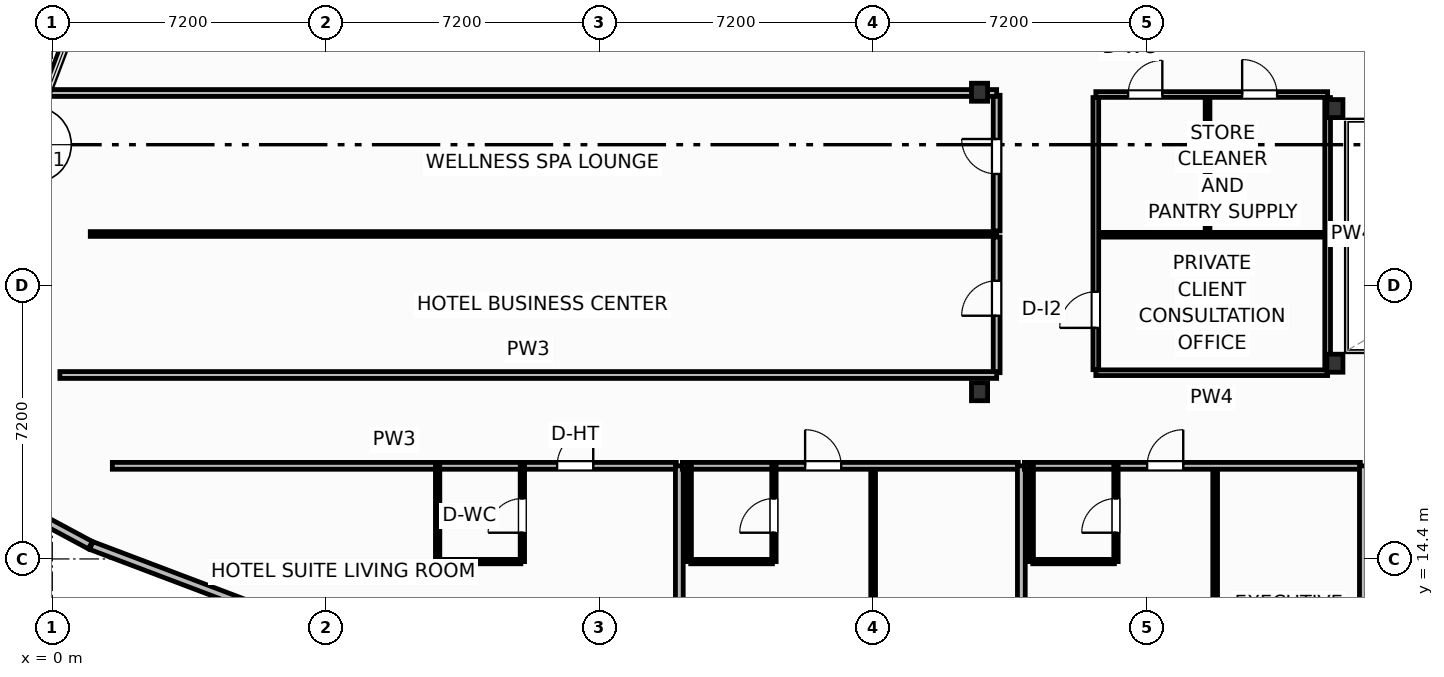
"""IFC4 building model, lengths in metres.
Left out: names, types, materials, properties, quantities, classifications, styles, units other than length and angle.
Written with IfcOpenShell. Run it as: python <this file> out.ifc"""

import sys

from ifc_helpers import new_model, si_unit, direction, frame, frame_2d, origin, origin_2d, place, context, subcontext, project, spatial, rectangle, i_section, extrude, element, fill, save


model = new_model("IFC4")
c1 = context("Model", 3, precision=1e-05, world=origin(), true_north=direction((0.0, 1.0)))
c2 = subcontext(c1, "Body", "Model", "MODEL_VIEW")
j1 = project(units=[si_unit("LENGTHUNIT", "METRE"), si_unit("PLANEANGLEUNIT", "RADIAN")], contexts=[c1])
p1 = place(None, origin())
s1 = spatial("IfcSite", under=j1, at=p1, CompositionType="ELEMENT")
p2 = place(p1, origin())
s2 = spatial("IfcBuilding", under=s1, at=p2, CompositionType="ELEMENT")
p3 = place(p2, frame((0.0, 0.0, 83.6)))
s3 = spatial("IfcBuildingStorey", under=s2, at=p3, CompositionType="ELEMENT", Elevation=83.6)
for number, where, z_axis, x_axis in (
    (1, (33.75, 19.55, 0.0), (0.0, 0.0, 1.0), (1.0, 0.0, 0.0)),
    (2, (33.75, 26.25, 0.0), (0.0, 0.0, 1.0), (1.0, 0.0, 0.0)),
    (3, (24.4, 18.8, 0.0), (0.0, 0.0, 1.0), (1.0, 0.0, 0.0)),
    (4, (24.4, 26.68, 0.0), (0.0, 0.0, 1.0), (1.0, 0.0, 0.0)),
):
    element("IfcColumn", number, at=place(p3, frame(where, z_axis=z_axis, x_axis=x_axis)), inside=s3, PredefinedType="COLUMN", context=c2, shape_type="SweptSolid", body=[
        extrude(i_section(OverallWidth=0.424, OverallDepth=0.474, WebThickness=0.048, FlangeThickness=0.077, FilletRadius=0.025, at=origin_2d()), origin(), (0.0, 0.0, 1.0), 3.7),
    ])
p4 = place(p3, frame((-0.197, 15.406, 0.0), z_axis=(0.0, 0.0, 1.0), x_axis=(0.881023507585, -0.47307248819, 0.0)))
e5 = element("IfcWall", 5, at=p4, inside=s3, PredefinedType="SOLIDWALL", context=c2, shape_type="SweptSolid", body=[
    extrude(rectangle(XDim=1.361, YDim=0.22, at=frame_2d((0.68, 0.0))), origin(), (0.0, 0.0, 1.0), 2.73),
])
p5 = place(p3, frame((1.026, 14.753, 0.0), z_axis=(0.0, 0.0, 1.0), x_axis=(0.935222448475, -0.354060689526, 0.0)))
e6 = element("IfcWall", 6, at=p5, inside=s3, PredefinedType="SOLIDWALL", context=c2, shape_type="SweptSolid", body=[
    extrude(rectangle(XDim=14.447, YDim=0.22, at=frame_2d((7.224, 0.0))), origin(), (0.0, 0.0, 1.0), 2.73),
])
p6 = place(p5, frame((6.399, 0.0, 0.8)))
e7 = element("IfcOpeningElement", 7, at=p6, cuts=e6, PredefinedType="OPENING", context=c2, shape_type="SweptSolid", body=[
    extrude(rectangle(XDim=1.65, YDim=1.65, at=frame_2d((0.825, 0.825))), frame((0.0, 0.12, 0.0), z_axis=(0.0, -1.0, 0.0), x_axis=(1.0, 0.0, 0.0)), (0.0, 0.0, 1.0), 0.24),
])
p7 = place(p3, frame((1.58, 16.85, 0.0), z_axis=(0.0, 0.0, 1.0), x_axis=(1.0, 0.0, 0.0)))
e8 = element("IfcWall", 8, at=p7, inside=s3, PredefinedType="PARTITIONING", context=c2, shape_type="SweptSolid", body=[
    extrude(rectangle(XDim=14.84, YDim=0.18, at=frame_2d((7.42, 0.0))), origin(), (0.0, 0.0, 1.0), 3.45),
])
p8 = place(p7, frame((11.705, 0.0, 0.0)))
e9 = element("IfcOpeningElement", 9, at=p8, cuts=e8, PredefinedType="OPENING", context=c2, shape_type="SweptSolid", body=[
    extrude(rectangle(XDim=0.95, YDim=2.15, at=frame_2d((0.475, 1.075))), frame((0.0, 0.1, 0.0), z_axis=(0.0, -1.0, 0.0), x_axis=(1.0, 0.0, 0.0)), (0.0, 0.0, 1.0), 0.2),
])
p9 = place(p3, frame((10.18, 14.33, 0.0), z_axis=(0.0, 0.0, 1.0), x_axis=(1.0, 0.0, 0.0)))
e10 = element("IfcWall", 10, at=p9, inside=s3, PredefinedType="PARTITIONING", context=c2, shape_type="SweptSolid", body=[
    extrude(rectangle(XDim=2.15, YDim=0.115, at=frame_2d((1.075, 0.0))), origin(), (0.0, 0.0, 1.0), 3.45),
])
p10 = place(p3, frame((12.37, 14.33, 0.0), z_axis=(0.0, 0.0, 1.0), x_axis=(0.0, 1.0, 0.0)))
e11 = element("IfcWall", 11, at=p10, inside=s3, PredefinedType="PARTITIONING", context=c2, shape_type="SweptSolid", body=[
    extrude(rectangle(XDim=2.52, YDim=0.115, at=frame_2d((1.26, 0.0))), origin(), (0.0, 0.0, 1.0), 3.45),
])
p11 = place(p10, frame((0.76, 0.0, 0.0)))
e12 = element("IfcOpeningElement", 12, at=p11, cuts=e11, PredefinedType="OPENING", context=c2, shape_type="SweptSolid", body=[
    extrude(rectangle(XDim=0.9, YDim=2.05, at=frame_2d((0.45, 1.025))), frame((0.0, 0.067, 0.0), z_axis=(0.0, -1.0, 0.0), x_axis=(1.0, 0.0, 0.0)), (0.0, 0.0, 1.0), 0.135),
])
p12 = place(p3, frame((10.14, 14.33, 0.0), z_axis=(0.0, 0.0, 1.0), x_axis=(0.0, 1.0, 0.0)))
e13 = element("IfcWall", 13, at=p12, inside=s3, PredefinedType="PARTITIONING", context=c2, shape_type="SweptSolid", body=[
    extrude(rectangle(XDim=2.52, YDim=0.115, at=frame_2d((1.26, 0.0))), origin(), (0.0, 0.0, 1.0), 3.45),
])
p13 = place(p3, frame((16.5, 11.161, 0.0), z_axis=(0.0, 0.0, 1.0), x_axis=(0.0, 1.0, 0.0)))
e14 = element("IfcWall", 14, at=p13, inside=s3, PredefinedType="PARTITIONING", context=c2, shape_type="SweptSolid", body=[
    extrude(rectangle(XDim=5.689, YDim=0.205, at=frame_2d((2.844, 0.0))), origin(), (0.0, 0.0, 1.0), 3.45),
])
p14 = place(p3, frame((21.6, 6.985, 0.0), z_axis=(0.0, 0.0, 1.0), x_axis=(0.0, 1.0, 0.0)))
e15 = element("IfcWall", 15, at=p14, inside=s3, PredefinedType="PARTITIONING", context=c2, shape_type="SweptSolid", body=[
    extrude(rectangle(XDim=9.865, YDim=0.125, at=frame_2d((4.933, 0.0))), origin(), (0.0, 0.0, 1.0), 3.45),
])
p15 = place(p14, frame((3.578, 0.0, 0.0)))
e16 = element("IfcOpeningElement", 16, at=p15, cuts=e15, PredefinedType="OPENING", context=c2, shape_type="SweptSolid", body=[
    extrude(rectangle(XDim=0.92, YDim=2.05, at=frame_2d((0.46, 1.025))), frame((0.0, 0.073, 0.0), z_axis=(0.0, -1.0, 0.0), x_axis=(1.0, 0.0, 0.0)), (0.0, 0.0, 1.0), 0.145),
])
p16 = place(p3, frame((16.58, 16.85, 0.0), z_axis=(0.0, 0.0, 1.0), x_axis=(1.0, 0.0, 0.0)))
e17 = element("IfcWall", 17, at=p16, inside=s3, PredefinedType="PARTITIONING", context=c2, shape_type="SweptSolid", body=[
    extrude(rectangle(XDim=8.84, YDim=0.18, at=frame_2d((4.42, 0.0))), origin(), (0.0, 0.0, 1.0), 3.45),
])
p17 = place(p16, frame((3.23, 0.0, 0.0)))
e18 = element("IfcOpeningElement", 18, at=p17, cuts=e17, PredefinedType="OPENING", context=c2, shape_type="SweptSolid", body=[
    extrude(rectangle(XDim=0.95, YDim=2.15, at=frame_2d((0.475, 1.075))), frame((0.0, 0.1, 0.0), z_axis=(0.0, -1.0, 0.0), x_axis=(1.0, 0.0, 0.0)), (0.0, 0.0, 1.0), 0.2),
])
p18 = place(p3, frame((16.8, 14.33, 0.0), z_axis=(0.0, 0.0, 1.0), x_axis=(1.0, 0.0, 0.0)))
e19 = element("IfcWall", 19, at=p18, inside=s3, PredefinedType="PARTITIONING", context=c2, shape_type="SweptSolid", body=[
    extrude(rectangle(XDim=2.15, YDim=0.115, at=frame_2d((1.075, 0.0))), origin(), (0.0, 0.0, 1.0), 3.45),
])
p19 = place(p3, frame((18.99, 14.33, 0.0), z_axis=(0.0, 0.0, 1.0), x_axis=(0.0, 1.0, 0.0)))
e20 = element("IfcWall", 20, at=p19, inside=s3, PredefinedType="PARTITIONING", context=c2, shape_type="SweptSolid", body=[
    extrude(rectangle(XDim=2.52, YDim=0.115, at=frame_2d((1.26, 0.0))), origin(), (0.0, 0.0, 1.0), 3.45),
])
p20 = place(p19, frame((0.76, 0.0, 0.0)))
e21 = element("IfcOpeningElement", 21, at=p20, cuts=e20, PredefinedType="OPENING", context=c2, shape_type="SweptSolid", body=[
    extrude(rectangle(XDim=0.9, YDim=2.05, at=frame_2d((0.45, 1.025))), frame((0.0, 0.067, 0.0), z_axis=(0.0, -1.0, 0.0), x_axis=(1.0, 0.0, 0.0)), (0.0, 0.0, 1.0), 0.135),
])
p21 = place(p3, frame((16.76, 14.33, 0.0), z_axis=(0.0, 0.0, 1.0), x_axis=(0.0, 1.0, 0.0)))
e22 = element("IfcWall", 22, at=p21, inside=s3, PredefinedType="PARTITIONING", context=c2, shape_type="SweptSolid", body=[
    extrude(rectangle(XDim=2.52, YDim=0.115, at=frame_2d((1.26, 0.0))), origin(), (0.0, 0.0, 1.0), 3.45),
])
p22 = place(p3, frame((25.5, 5.509, 0.0), z_axis=(0.0, 0.0, 1.0), x_axis=(0.0, 1.0, 0.0)))
e23 = element("IfcWall", 23, at=p22, inside=s3, PredefinedType="PARTITIONING", context=c2, shape_type="SweptSolid", body=[
    extrude(rectangle(XDim=11.342, YDim=0.205, at=frame_2d((5.671, 0.0))), origin(), (0.0, 0.0, 1.0), 3.45),
])
p23 = place(p3, frame((30.6, 5.823, 0.0), z_axis=(0.0, 0.0, 1.0), x_axis=(0.0, 1.0, 0.0)))
e24 = element("IfcWall", 24, at=p23, inside=s3, PredefinedType="PARTITIONING", context=c2, shape_type="SweptSolid", body=[
    extrude(rectangle(XDim=11.027, YDim=0.125, at=frame_2d((5.513, 0.0))), origin(), (0.0, 0.0, 1.0), 3.45),
])
p24 = place(p23, frame((1.42, 0.0, 0.0)))
e25 = element("IfcOpeningElement", 25, at=p24, cuts=e24, PredefinedType="OPENING", context=c2, shape_type="SweptSolid", body=[
    extrude(rectangle(XDim=0.92, YDim=2.05, at=frame_2d((0.46, 1.025))), frame((0.0, 0.073, 0.0), z_axis=(0.0, -1.0, 0.0), x_axis=(1.0, 0.0, 0.0)), (0.0, 0.0, 1.0), 0.145),
])
p25 = place(p3, frame((25.58, 16.85, 0.0), z_axis=(0.0, 0.0, 1.0), x_axis=(1.0, 0.0, 0.0)))
e26 = element("IfcWall", 26, at=p25, inside=s3, PredefinedType="PARTITIONING", context=c2, shape_type="SweptSolid", body=[
    extrude(rectangle(XDim=8.84, YDim=0.18, at=frame_2d((4.42, 0.0))), origin(), (0.0, 0.0, 1.0), 3.45),
])
p26 = place(p25, frame((3.23, 0.0, 0.0)))
e27 = element("IfcOpeningElement", 27, at=p26, cuts=e26, PredefinedType="OPENING", context=c2, shape_type="SweptSolid", body=[
    extrude(rectangle(XDim=0.95, YDim=2.15, at=frame_2d((0.475, 1.075))), frame((0.0, 0.1, 0.0), z_axis=(0.0, -1.0, 0.0), x_axis=(1.0, 0.0, 0.0)), (0.0, 0.0, 1.0), 0.2),
])
p27 = place(p3, frame((25.8, 14.33, 0.0), z_axis=(0.0, 0.0, 1.0), x_axis=(1.0, 0.0, 0.0)))
e28 = element("IfcWall", 28, at=p27, inside=s3, PredefinedType="PARTITIONING", context=c2, shape_type="SweptSolid", body=[
    extrude(rectangle(XDim=2.15, YDim=0.115, at=frame_2d((1.075, 0.0))), origin(), (0.0, 0.0, 1.0), 3.45),
])
p28 = place(p3, frame((27.99, 14.33, 0.0), z_axis=(0.0, 0.0, 1.0), x_axis=(0.0, 1.0, 0.0)))
e29 = element("IfcWall", 29, at=p28, inside=s3, PredefinedType="PARTITIONING", context=c2, shape_type="SweptSolid", body=[
    extrude(rectangle(XDim=2.52, YDim=0.115, at=frame_2d((1.26, 0.0))), origin(), (0.0, 0.0, 1.0), 3.45),
])
p29 = place(p28, frame((0.76, 0.0, 0.0)))
e30 = element("IfcOpeningElement", 30, at=p29, cuts=e29, PredefinedType="OPENING", context=c2, shape_type="SweptSolid", body=[
    extrude(rectangle(XDim=0.9, YDim=2.05, at=frame_2d((0.45, 1.025))), frame((0.0, 0.067, 0.0), z_axis=(0.0, -1.0, 0.0), x_axis=(1.0, 0.0, 0.0)), (0.0, 0.0, 1.0), 0.135),
])
p30 = place(p3, frame((25.76, 14.33, 0.0), z_axis=(0.0, 0.0, 1.0), x_axis=(0.0, 1.0, 0.0)))
e31 = element("IfcWall", 31, at=p30, inside=s3, PredefinedType="PARTITIONING", context=c2, shape_type="SweptSolid", body=[
    extrude(rectangle(XDim=2.52, YDim=0.115, at=frame_2d((1.26, 0.0))), origin(), (0.0, 0.0, 1.0), 3.45),
])
p31 = place(p3, frame((34.5, 4.344, 0.0), z_axis=(0.0, 0.0, 1.0), x_axis=(0.0, 1.0, 0.0)))
e32 = element("IfcWall", 32, at=p31, inside=s3, PredefinedType="PARTITIONING", context=c2, shape_type="SweptSolid", body=[
    extrude(rectangle(XDim=12.506, YDim=0.205, at=frame_2d((6.253, 0.0))), origin(), (0.0, 0.0, 1.0), 3.45),
])
p32 = place(p3, frame((24.85, 19.3, 0.0), z_axis=(0.0, 0.0, 1.0), x_axis=(0.0, 1.0, 0.0)))
e33 = element("IfcWall", 33, at=p32, inside=s3, PredefinedType="PARTITIONING", context=c2, shape_type="SweptSolid", body=[
    extrude(rectangle(XDim=3.57, YDim=0.18, at=frame_2d((1.785, 0.0))), origin(), (0.0, 0.0, 1.0), 3.45),
])
p33 = place(p32, frame((1.5, 0.0, 0.0)))
e34 = element("IfcOpeningElement", 34, at=p33, cuts=e33, PredefinedType="OPENING", context=c2, shape_type="SweptSolid", body=[
    extrude(rectangle(XDim=0.92, YDim=2.05, at=frame_2d((0.46, 1.025))), frame((0.0, 0.1, 0.0), z_axis=(0.0, -1.0, 0.0), x_axis=(1.0, 0.0, 0.0)), (0.0, 0.0, 1.0), 0.2),
])
p34 = place(p3, frame((24.85, 23.03, 0.0), z_axis=(0.0, 0.0, 1.0), x_axis=(0.0, 1.0, 0.0)))
e35 = element("IfcWall", 35, at=p34, inside=s3, PredefinedType="PARTITIONING", context=c2, shape_type="SweptSolid", body=[
    extrude(rectangle(XDim=3.57, YDim=0.18, at=frame_2d((1.785, 0.0))), origin(), (0.0, 0.0, 1.0), 3.45),
])
p35 = place(p34, frame((1.5, 0.0, 0.0)))
e36 = element("IfcOpeningElement", 36, at=p35, cuts=e35, PredefinedType="OPENING", context=c2, shape_type="SweptSolid", body=[
    extrude(rectangle(XDim=0.92, YDim=2.05, at=frame_2d((0.46, 1.025))), frame((0.0, 0.1, 0.0), z_axis=(0.0, -1.0, 0.0), x_axis=(1.0, 0.0, 0.0)), (0.0, 0.0, 1.0), 0.2),
])
p36 = place(p3, frame((1.0, 22.95, 0.0), z_axis=(0.0, 0.0, 1.0), x_axis=(1.0, 0.0, 0.0)))
e37 = element("IfcWall", 37, at=p36, inside=s3, PredefinedType="PARTITIONING", context=c2, shape_type="SweptSolid", body=[
    extrude(rectangle(XDim=23.85, YDim=0.125, at=frame_2d((11.925, 0.0))), origin(), (0.0, 0.0, 1.0), 3.45),
])
p37 = place(p3, frame((0.2, 19.24, 0.0), z_axis=(0.0, 0.0, 1.0), x_axis=(1.0, 0.0, 0.0)))
e38 = element("IfcWall", 38, at=p37, inside=s3, PredefinedType="PARTITIONING", context=c2, shape_type="SweptSolid", body=[
    extrude(rectangle(XDim=24.65, YDim=0.18, at=frame_2d((12.325, 0.0))), origin(), (0.0, 0.0, 1.0), 3.45),
])
p38 = place(p3, frame((-0.086, 26.66, 0.0), z_axis=(0.0, 0.0, 1.0), x_axis=(1.0, 0.0, 0.0)))
e39 = element("IfcWall", 39, at=p38, inside=s3, PredefinedType="PARTITIONING", context=c2, shape_type="SweptSolid", body=[
    extrude(rectangle(XDim=24.936, YDim=0.18, at=frame_2d((12.468, 0.0))), origin(), (0.0, 0.0, 1.0), 2.662),
])
p39 = place(p3, frame((27.46, 19.3, 0.0), z_axis=(0.0, 0.0, 1.0), x_axis=(1.0, 0.0, 0.0)))
e40 = element("IfcWall", 40, at=p39, inside=s3, PredefinedType="PARTITIONING", context=c2, shape_type="SweptSolid", body=[
    extrude(rectangle(XDim=6.1, YDim=0.15, at=frame_2d((3.05, 0.0))), origin(), (0.0, 0.0, 1.0), 2.662),
])
p40 = place(p3, frame((27.46, 26.62, 0.0), z_axis=(0.0, 0.0, 1.0), x_axis=(1.0, 0.0, 0.0)))
e41 = element("IfcWall", 41, at=p40, inside=s3, PredefinedType="PARTITIONING", context=c2, shape_type="SweptSolid", body=[
    extrude(rectangle(XDim=6.1, YDim=0.15, at=frame_2d((3.05, 0.0))), origin(), (0.0, 0.0, 1.0), 2.662),
])
p41 = place(p40, frame((0.85, 0.0, 0.0)))
e42 = element("IfcOpeningElement", 42, at=p41, cuts=e41, PredefinedType="OPENING", context=c2, shape_type="SweptSolid", body=[
    extrude(rectangle(XDim=0.9, YDim=2.05, at=frame_2d((0.45, 1.025))), frame((0.0, 0.085, 0.0), z_axis=(0.0, -1.0, 0.0), x_axis=(1.0, 0.0, 0.0)), (0.0, 0.0, 1.0), 0.17),
])
p42 = place(p40, frame((3.85, 0.0, 0.0)))
e43 = element("IfcOpeningElement", 43, at=p42, cuts=e41, PredefinedType="OPENING", context=c2, shape_type="SweptSolid", body=[
    extrude(rectangle(XDim=0.92, YDim=2.05, at=frame_2d((0.46, 1.025))), frame((0.0, 0.085, 0.0), z_axis=(0.0, -1.0, 0.0), x_axis=(1.0, 0.0, 0.0)), (0.0, 0.0, 1.0), 0.17),
])
p43 = place(p3, frame((27.52, 22.93, 0.0), z_axis=(0.0, 0.0, 1.0), x_axis=(1.0, 0.0, 0.0)))
e44 = element("IfcWall", 44, at=p43, inside=s3, PredefinedType="PARTITIONING", context=c2, shape_type="SweptSolid", body=[
    extrude(rectangle(XDim=6.0, YDim=0.125, at=frame_2d((3.0, 0.0))), origin(), (0.0, 0.0, 1.0), 3.45),
])
p44 = place(p3, frame((30.4, 23.0, 0.0), z_axis=(0.0, 0.0, 1.0), x_axis=(0.0, 1.0, 0.0)))
e45 = element("IfcWall", 45, at=p44, inside=s3, PredefinedType="PARTITIONING", context=c2, shape_type="SweptSolid", body=[
    extrude(rectangle(XDim=3.54, YDim=0.125, at=frame_2d((1.77, 0.0))), origin(), (0.0, 0.0, 1.0), 3.45),
])
p45 = place(p3, frame((27.46, 19.38, 0.0), z_axis=(0.0, 0.0, 1.0), x_axis=(0.0, 1.0, 0.0)))
e46 = element("IfcWall", 46, at=p45, inside=s3, PredefinedType="PARTITIONING", context=c2, shape_type="SweptSolid", body=[
    extrude(rectangle(XDim=7.16, YDim=0.15, at=frame_2d((3.58, 0.0))), origin(), (0.0, 0.0, 1.0), 3.45),
])
p46 = place(p45, frame((1.1, 0.0, 0.0)))
e47 = element("IfcOpeningElement", 47, at=p46, cuts=e46, PredefinedType="OPENING", context=c2, shape_type="SweptSolid", body=[
    extrude(rectangle(XDim=0.95, YDim=2.05, at=frame_2d((0.475, 1.025))), frame((0.0, 0.085, 0.0), z_axis=(0.0, -1.0, 0.0), x_axis=(1.0, 0.0, 0.0)), (0.0, 0.0, 1.0), 0.17),
])
p47 = place(p3, frame((33.56, 19.38, 0.0), z_axis=(0.0, 0.0, 1.0), x_axis=(0.0, 1.0, 0.0)))
e48 = element("IfcWall", 48, at=p47, inside=s3, PredefinedType="PARTITIONING", context=c2, shape_type="SweptSolid", body=[
    extrude(rectangle(XDim=7.16, YDim=0.15, at=frame_2d((3.58, 0.0))), origin(), (0.0, 0.0, 1.0), 2.824),
])
p48 = place(p8, origin())
e49 = element("IfcDoor", 49, at=p48, inside=s3, OperationType="SINGLE_SWING_RIGHT", PredefinedType="DOOR", context=c2, shape_type="SweptSolid", body=[
    extrude(rectangle(XDim=0.95, YDim=2.15, at=frame_2d((0.475, 1.075))), frame((0.0, 0.025, 0.0), z_axis=(0.0, -1.0, 0.0), x_axis=(1.0, 0.0, 0.0)), (0.0, 0.0, 1.0), 0.05),
])
fill(e9, e49)
p49 = place(p11, origin())
e50 = element("IfcDoor", 50, at=p49, inside=s3, OperationType="SINGLE_SWING_LEFT", PredefinedType="DOOR", context=c2, shape_type="SweptSolid", body=[
    extrude(rectangle(XDim=0.9, YDim=2.05, at=frame_2d((0.45, 1.025))), frame((0.0, 0.025, 0.0), z_axis=(0.0, -1.0, 0.0), x_axis=(1.0, 0.0, 0.0)), (0.0, 0.0, 1.0), 0.05),
])
fill(e12, e50)
p50 = place(p17, origin())
e51 = element("IfcDoor", 51, at=p50, inside=s3, OperationType="SINGLE_SWING_LEFT", PredefinedType="DOOR", context=c2, shape_type="SweptSolid", body=[
    extrude(rectangle(XDim=0.95, YDim=2.15, at=frame_2d((0.475, 1.075))), frame((0.0, 0.025, 0.0), z_axis=(0.0, -1.0, 0.0), x_axis=(1.0, 0.0, 0.0)), (0.0, 0.0, 1.0), 0.05),
])
fill(e18, e51)
p51 = place(p20, origin())
e52 = element("IfcDoor", 52, at=p51, inside=s3, OperationType="SINGLE_SWING_LEFT", PredefinedType="DOOR", context=c2, shape_type="SweptSolid", body=[
    extrude(rectangle(XDim=0.9, YDim=2.05, at=frame_2d((0.45, 1.025))), frame((0.0, 0.025, 0.0), z_axis=(0.0, -1.0, 0.0), x_axis=(1.0, 0.0, 0.0)), (0.0, 0.0, 1.0), 0.05),
])
fill(e21, e52)
p52 = place(p26, origin())
e53 = element("IfcDoor", 53, at=p52, inside=s3, OperationType="SINGLE_SWING_RIGHT", PredefinedType="DOOR", context=c2, shape_type="SweptSolid", body=[
    extrude(rectangle(XDim=0.95, YDim=2.15, at=frame_2d((0.475, 1.075))), frame((0.0, 0.025, 0.0), z_axis=(0.0, -1.0, 0.0), x_axis=(1.0, 0.0, 0.0)), (0.0, 0.0, 1.0), 0.05),
])
fill(e27, e53)
p53 = place(p29, origin())
e54 = element("IfcDoor", 54, at=p53, inside=s3, OperationType="SINGLE_SWING_LEFT", PredefinedType="DOOR", context=c2, shape_type="SweptSolid", body=[
    extrude(rectangle(XDim=0.9, YDim=2.05, at=frame_2d((0.45, 1.025))), frame((0.0, 0.025, 0.0), z_axis=(0.0, -1.0, 0.0), x_axis=(1.0, 0.0, 0.0)), (0.0, 0.0, 1.0), 0.05),
])
fill(e30, e54)
p54 = place(p33, origin())
e55 = element("IfcDoor", 55, at=p54, inside=s3, OperationType="SINGLE_SWING_LEFT", PredefinedType="DOOR", context=c2, shape_type="SweptSolid", body=[
    extrude(rectangle(XDim=0.92, YDim=2.05, at=frame_2d((0.46, 1.025))), frame((0.0, 0.025, 0.0), z_axis=(0.0, -1.0, 0.0), x_axis=(1.0, 0.0, 0.0)), (0.0, 0.0, 1.0), 0.05),
])
fill(e34, e55)
p55 = place(p35, origin())
e56 = element("IfcDoor", 56, at=p55, inside=s3, OperationType="SINGLE_SWING_RIGHT", PredefinedType="DOOR", context=c2, shape_type="SweptSolid", body=[
    extrude(rectangle(XDim=0.92, YDim=2.05, at=frame_2d((0.46, 1.025))), frame((0.0, 0.025, 0.0), z_axis=(0.0, -1.0, 0.0), x_axis=(1.0, 0.0, 0.0)), (0.0, 0.0, 1.0), 0.05),
])
fill(e36, e56)
p56 = place(p41, origin())
e57 = element("IfcDoor", 57, at=p56, inside=s3, OperationType="SINGLE_SWING_RIGHT", PredefinedType="DOOR", context=c2, shape_type="SweptSolid", body=[
    extrude(rectangle(XDim=0.9, YDim=2.05, at=frame_2d((0.45, 1.025))), frame((0.0, 0.025, 0.0), z_axis=(0.0, -1.0, 0.0), x_axis=(1.0, 0.0, 0.0)), (0.0, 0.0, 1.0), 0.05),
])
fill(e42, e57)
p57 = place(p42, origin())
e58 = element("IfcDoor", 58, at=p57, inside=s3, OperationType="SINGLE_SWING_LEFT", PredefinedType="DOOR", context=c2, shape_type="SweptSolid", body=[
    extrude(rectangle(XDim=0.92, YDim=2.05, at=frame_2d((0.46, 1.025))), frame((0.0, 0.025, 0.0), z_axis=(0.0, -1.0, 0.0), x_axis=(1.0, 0.0, 0.0)), (0.0, 0.0, 1.0), 0.05),
])
fill(e43, e58)
p58 = place(p46, origin())
e59 = element("IfcDoor", 59, at=p58, inside=s3, OperationType="SINGLE_SWING_LEFT", PredefinedType="DOOR", context=c2, shape_type="SweptSolid", body=[
    extrude(rectangle(XDim=0.95, YDim=2.05, at=frame_2d((0.475, 1.025))), frame((0.0, 0.025, 0.0), z_axis=(0.0, -1.0, 0.0), x_axis=(1.0, 0.0, 0.0)), (0.0, 0.0, 1.0), 0.05),
])
fill(e47, e59)
save(model, sys.argv[1])
